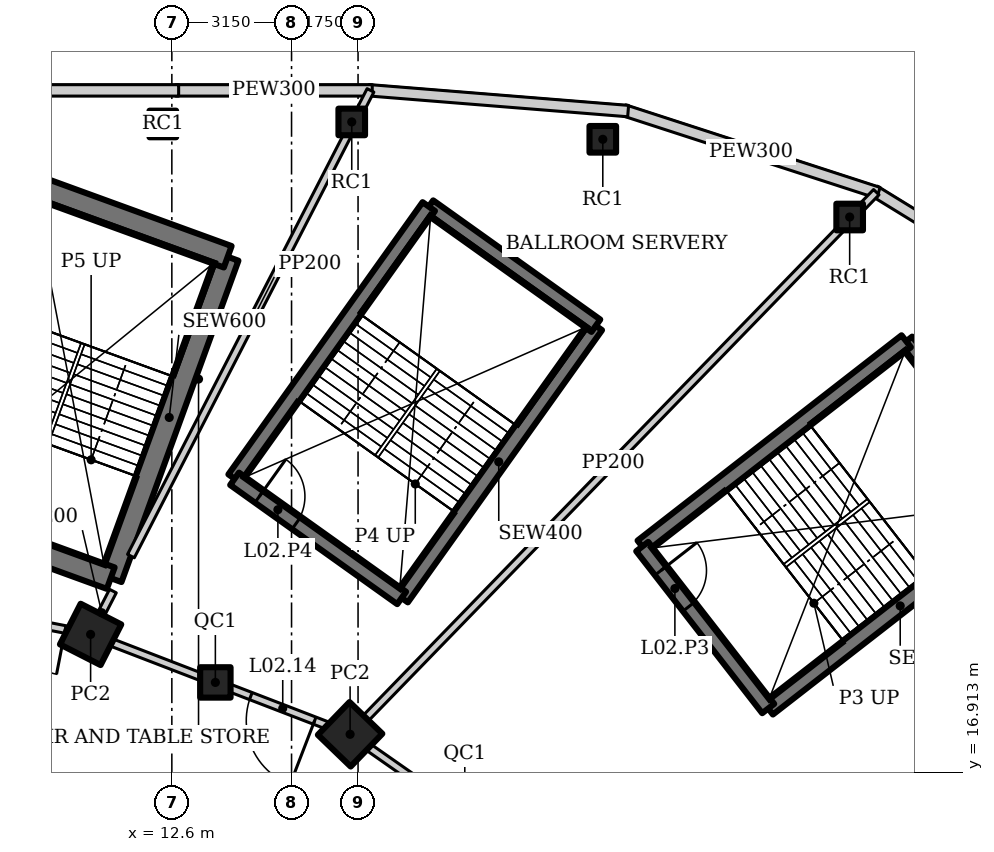
"""IFC4 building model, lengths in metres.
Left out: names, types, materials, properties, quantities, classifications, styles, units other than length and angle.
Written with IfcOpenShell. Run it as: python <this file> out.ifc"""

import sys

from ifc_helpers import new_model, si_unit, direction, frame, frame_2d, origin, origin_2d, place, context, subcontext, project, spatial, rectangle, hollow_rectangle, extrude, element, fill, save


model = new_model("IFC4")
c1 = context("Model", 3, precision=1e-05, world=origin(), true_north=direction((0.0, 1.0)))
c2 = subcontext(c1, "Body", "Model", "MODEL_VIEW")
j1 = project(units=[si_unit("LENGTHUNIT", "METRE"), si_unit("PLANEANGLEUNIT", "RADIAN")], contexts=[c1])
p1 = place(None, origin())
s1 = spatial("IfcSite", under=j1, at=p1, CompositionType="ELEMENT")
p2 = place(p1, origin())
s2 = spatial("IfcBuilding", under=s1, at=p2, CompositionType="ELEMENT")
p3 = place(p2, frame((0.0, 0.0, 14.5)))
s3 = spatial("IfcBuildingStorey", under=s2, at=p3, CompositionType="ELEMENT", Elevation=14.5)
for number, where, z_axis, x_axis in (
    (1, (17.291, 17.905, 0.0), (0.0, 0.0, 1.0), (0.695, 0.719, 0.0)),
    (2, (10.463, 20.534, 0.0), (0.0, 0.0, 1.0), (0.454, 0.891, 0.0)),
):
    element("IfcColumn", number, at=place(p3, frame(where, z_axis=z_axis, x_axis=x_axis)), inside=s3, PredefinedType="COLUMN", context=c2, shape_type="SweptSolid", body=[
        extrude(hollow_rectangle(XDim=1.2, YDim=1.2, WallThickness=0.1, at=origin_2d()), origin(), (0.0, 0.0, 1.0), 7.5),
    ])
p4 = place(p3, frame((13.745, 19.27, 0.0), z_axis=(0.0, 0.0, 1.0), x_axis=(1.0, 0.0, 0.0)))
e3 = element("IfcColumn", 3, at=p4, inside=s3, PredefinedType="COLUMN", context=c2, shape_type="SweptSolid", body=[
    extrude(hollow_rectangle(XDim=0.8, YDim=0.8, WallThickness=0.05, at=origin_2d()), origin(), (0.0, 0.0, 1.0), 7.5),
])
for number, where, z_axis, x_axis in (
    (4, (23.94, 33.563, 0.0), (0.0, 0.0, 1.0), (1.0, 0.0, 0.0)),
    (5, (12.363, 33.966, 0.0), (0.0, 0.0, 1.0), (1.0, 0.0, 0.0)),
    (6, (30.436, 31.518, 0.0), (0.0, 0.0, 1.0), (1.0, 0.0, 0.0)),
    (7, (17.334, 34.02, 0.0), (0.0, 0.0, 1.0), (1.0, 0.0, 0.0)),
):
    element("IfcColumn", number, at=place(p3, frame(where, z_axis=z_axis, x_axis=x_axis)), inside=s3, PredefinedType="COLUMN", context=c2, shape_type="SweptSolid", body=[
        extrude(hollow_rectangle(XDim=0.7, YDim=0.7, WallThickness=0.04, at=origin_2d()), origin(), (0.0, 0.0, 1.0), 7.5),
    ])
p5 = place(p3, frame((36.932, 28.608, 0.0), z_axis=(0.0, 0.0, 1.0), x_axis=(-0.851808565246, 0.52385319334, 0.0)))
e8 = element("IfcWall", 8, at=p5, inside=s3, PredefinedType="SOLIDWALL", context=c2, shape_type="SweptSolid", body=[
    extrude(rectangle(XDim=6.861, YDim=0.3, at=frame_2d((3.43, 0.0))), origin(), (0.0, 0.0, 1.0), 7.3),
])
p6 = place(p3, frame((31.192, 32.154, 0.0), z_axis=(0.0, 0.0, 1.0), x_axis=(-0.951140010357, 0.308759907853, 0.0)))
e9 = element("IfcWall", 9, at=p6, inside=s3, PredefinedType="SOLIDWALL", context=c2, shape_type="SweptSolid", body=[
    extrude(rectangle(XDim=7.041, YDim=0.3, at=frame_2d((3.521, 0.0))), origin(), (0.0, 0.0, 1.0), 7.3),
])
p7 = place(p3, frame((24.607, 34.306, 0.0), z_axis=(0.0, 0.0, 1.0), x_axis=(-0.996791084449, 0.080047073422, 0.0)))
e10 = element("IfcWall", 10, at=p7, inside=s3, PredefinedType="SOLIDWALL", context=c2, shape_type="SweptSolid", body=[
    extrude(rectangle(XDim=6.847, YDim=0.3, at=frame_2d((3.424, 0.0))), origin(), (0.0, 0.0, 1.0), 7.3),
])
p8 = place(p3, frame((17.873, 34.85, 0.0), z_axis=(0.0, 0.0, 1.0), x_axis=(-1.0, 0.0, 0.0)))
e11 = element("IfcWall", 11, at=p8, inside=s3, PredefinedType="SOLIDWALL", context=c2, shape_type="SweptSolid", body=[
    extrude(rectangle(XDim=5.174, YDim=0.3, at=frame_2d((2.587, 0.0))), origin(), (0.0, 0.0, 1.0), 7.3),
])
p9 = place(p3, frame((12.779, 34.85, 0.0), z_axis=(0.0, 0.0, 1.0), x_axis=(-1.0, 0.0, 0.0)))
e12 = element("IfcWall", 12, at=p9, inside=s3, PredefinedType="SOLIDWALL", context=c2, shape_type="SweptSolid", body=[
    extrude(rectangle(XDim=4.739, YDim=0.3, at=frame_2d((2.369, 0.0))), origin(), (0.0, 0.0, 1.0), 7.3),
])
p10 = place(p3, frame((20.309, 15.794, 0.0), z_axis=(0.0, 0.0, 1.0), x_axis=(-0.819409395821, 0.573208724672, 0.0)))
e13 = element("IfcWall", 13, at=p10, inside=s3, PredefinedType="SOLIDWALL", context=c2, shape_type="SweptSolid", body=[
    extrude(rectangle(XDim=3.683, YDim=0.2, at=frame_2d((1.841, 0.0))), origin(), (0.0, 0.0, 1.0), 6.896),
])
p11 = place(p3, frame((17.291, 17.905, 0.0), z_axis=(0.0, 0.0, 1.0), x_axis=(-0.933224646415, 0.359293416754, 0.0)))
e14 = element("IfcWall", 14, at=p11, inside=s3, PredefinedType="SOLIDWALL", context=c2, shape_type="SweptSolid", body=[
    extrude(rectangle(XDim=3.799, YDim=0.2, at=frame_2d((1.899, 0.0))), origin(), (0.0, 0.0, 1.0), 6.764),
])
p12 = place(p11, frame((1.0, 0.0, 0.0)))
e15 = element("IfcOpeningElement", 15, at=p12, cuts=e14, PredefinedType="OPENING", context=c2, shape_type="SweptSolid", body=[
    extrude(rectangle(XDim=1.8, YDim=2.4, at=frame_2d((0.9, 1.2))), frame((0.0, 0.11, 0.0), z_axis=(0.0, -1.0, 0.0), x_axis=(1.0, 0.0, 0.0)), (0.0, 0.0, 1.0), 0.22),
])
p13 = place(p3, frame((13.745, 19.27, 0.0), z_axis=(0.0, 0.0, 1.0), x_axis=(-0.933241815012, 0.359248820058, 0.0)))
e16 = element("IfcWall", 16, at=p13, inside=s3, PredefinedType="SOLIDWALL", context=c2, shape_type="SweptSolid", body=[
    extrude(rectangle(XDim=3.518, YDim=0.2, at=frame_2d((1.759, 0.0))), origin(), (0.0, 0.0, 1.0), 6.896),
])
p14 = place(p3, frame((10.463, 20.534, 0.0), z_axis=(0.0, 0.0, 1.0), x_axis=(-0.98163593748, 0.190763954266, 0.0)))
e17 = element("IfcWall", 17, at=p14, inside=s3, PredefinedType="SOLIDWALL", context=c2, shape_type="SweptSolid", body=[
    extrude(rectangle(XDim=2.844, YDim=0.2, at=frame_2d((1.422, 0.0))), origin(), (0.0, 0.0, 1.0), 6.838),
])
p15 = place(p14, frame((0.68, 0.0, 0.0)))
e18 = element("IfcOpeningElement", 18, at=p15, cuts=e17, PredefinedType="OPENING", context=c2, shape_type="SweptSolid", body=[
    extrude(rectangle(XDim=1.2, YDim=2.4, at=frame_2d((0.6, 1.2))), frame((0.0, 0.11, 0.0), z_axis=(0.0, -1.0, 0.0), x_axis=(1.0, 0.0, 0.0)), (0.0, 0.0, 1.0), 0.22),
])
p16 = place(p3, frame((17.291, 17.905, 0.0), z_axis=(0.0, 0.0, 1.0), x_axis=(0.696460684513, 0.717594951855, 0.0)))
e19 = element("IfcWall", 19, at=p16, inside=s3, PredefinedType="SOLIDWALL", context=c2, shape_type="SweptSolid", body=[
    extrude(rectangle(XDim=19.881, YDim=0.2, at=frame_2d((9.94, 0.0))), origin(), (0.0, 0.0, 1.0), 5.8),
])
p17 = place(p3, frame((10.463, 20.534, 0.0), z_axis=(0.0, 0.0, 1.0), x_axis=(0.457464149219, 0.889228065335, 0.0)))
e20 = element("IfcWall", 20, at=p17, inside=s3, PredefinedType="SOLIDWALL", context=c2, shape_type="SweptSolid", body=[
    extrude(rectangle(XDim=1.282, YDim=0.2, at=frame_2d((0.641, 0.0))), origin(), (0.0, 0.0, 1.0), 5.8),
])
p18 = place(p3, frame((11.523, 22.595, 0.0), z_axis=(0.0, 0.0, 1.0), x_axis=(0.457451679948, 0.889234480051, 0.0)))
e21 = element("IfcWall", 21, at=p18, inside=s3, PredefinedType="SOLIDWALL", context=c2, shape_type="SweptSolid", body=[
    extrude(rectangle(XDim=13.782, YDim=0.2, at=frame_2d((6.891, 0.0))), origin(), (0.0, 0.0, 1.0), 5.8),
])
p19 = place(p3, frame((28.293, 18.583, 0.0), z_axis=(0.0, 0.0, 1.0), x_axis=(0.78938060008, 0.613904119726, 0.0)))
e22 = element("IfcWall", 22, at=p19, inside=s3, PredefinedType="SHEAR", context=c2, shape_type="SweptSolid", body=[
    extrude(rectangle(XDim=8.8, YDim=0.4, at=frame_2d((4.4, 0.0))), origin(), (0.0, 0.0, 1.0), 7.5),
])
p20 = place(p3, frame((35.239, 23.985, 0.0), z_axis=(0.0, 0.0, 1.0), x_axis=(-0.613912443548, 0.789374126544, 0.0)))
e23 = element("IfcWall", 23, at=p20, inside=s3, PredefinedType="SHEAR", context=c2, shape_type="SweptSolid", body=[
    extrude(rectangle(XDim=5.4, YDim=0.4, at=frame_2d((2.7, 0.0))), origin(), (0.0, 0.0, 1.0), 7.5),
])
p21 = place(p3, frame((31.924, 28.248, 0.0), z_axis=(0.0, 0.0, 1.0), x_axis=(-0.78938060008, -0.613904119726, 0.0)))
e24 = element("IfcWall", 24, at=p21, inside=s3, PredefinedType="SHEAR", context=c2, shape_type="SweptSolid", body=[
    extrude(rectangle(XDim=8.8, YDim=0.4, at=frame_2d((4.4, 0.0))), origin(), (0.0, 0.0, 1.0), 7.5),
])
p22 = place(p3, frame((24.978, 22.846, 0.0), z_axis=(0.0, 0.0, 1.0), x_axis=(0.613912443548, -0.789374126544, 0.0)))
e25 = element("IfcWall", 25, at=p22, inside=s3, PredefinedType="SHEAR", context=c2, shape_type="SweptSolid", body=[
    extrude(rectangle(XDim=5.4, YDim=0.4, at=frame_2d((2.7, 0.0))), origin(), (0.0, 0.0, 1.0), 7.5),
])
p23 = place(p22, frame((0.8, 0.0, 0.0)))
e26 = element("IfcOpeningElement", 26, at=p23, cuts=e25, PredefinedType="OPENING", context=c2, shape_type="SweptSolid", body=[
    extrude(rectangle(XDim=1.2, YDim=2.1, at=frame_2d((0.6, 1.05))), frame((0.0, 0.21, 0.0), z_axis=(0.0, -1.0, 0.0), x_axis=(1.0, 0.0, 0.0)), (0.0, 0.0, 1.0), 0.42),
])
p24 = place(p3, frame((18.647, 21.493, 0.0), z_axis=(0.0, 0.0, 1.0), x_axis=(0.580705313356, 0.814113836659, 0.0)))
e27 = element("IfcWall", 27, at=p24, inside=s3, PredefinedType="SHEAR", context=c2, shape_type="SweptSolid", body=[
    extrude(rectangle(XDim=8.8, YDim=0.4, at=frame_2d((4.4, 0.0))), origin(), (0.0, 0.0, 1.0), 7.5),
])
p25 = place(p3, frame((23.757, 28.657, 0.0), z_axis=(0.0, 0.0, 1.0), x_axis=(-0.814121252423, 0.580694916762, 0.0)))
e28 = element("IfcWall", 28, at=p25, inside=s3, PredefinedType="SHEAR", context=c2, shape_type="SweptSolid", body=[
    extrude(rectangle(XDim=5.4, YDim=0.4, at=frame_2d((2.7, 0.0))), origin(), (0.0, 0.0, 1.0), 7.5),
])
p26 = place(p3, frame((19.361, 31.793, 0.0), z_axis=(0.0, 0.0, 1.0), x_axis=(-0.580705313356, -0.814113836659, 0.0)))
e29 = element("IfcWall", 29, at=p26, inside=s3, PredefinedType="SHEAR", context=c2, shape_type="SweptSolid", body=[
    extrude(rectangle(XDim=8.8, YDim=0.4, at=frame_2d((4.4, 0.0))), origin(), (0.0, 0.0, 1.0), 7.5),
])
p27 = place(p3, frame((14.251, 24.629, 0.0), z_axis=(0.0, 0.0, 1.0), x_axis=(0.814121252423, -0.580694916762, 0.0)))
e30 = element("IfcWall", 30, at=p27, inside=s3, PredefinedType="SHEAR", context=c2, shape_type="SweptSolid", body=[
    extrude(rectangle(XDim=5.4, YDim=0.4, at=frame_2d((2.7, 0.0))), origin(), (0.0, 0.0, 1.0), 7.5),
])
p28 = place(p27, frame((0.8, 0.0, 0.0)))
e31 = element("IfcOpeningElement", 31, at=p28, cuts=e30, PredefinedType="OPENING", context=c2, shape_type="SweptSolid", body=[
    extrude(rectangle(XDim=1.2, YDim=2.1, at=frame_2d((0.6, 1.05))), frame((0.0, 0.21, 0.0), z_axis=(0.0, -1.0, 0.0), x_axis=(1.0, 0.0, 0.0)), (0.0, 0.0, 1.0), 0.42),
])
p29 = place(p3, frame((10.992, 22.014, 0.0), z_axis=(0.0, 0.0, 1.0), x_axis=(0.342013127703, 0.939695174234, 0.0)))
e32 = element("IfcWall", 32, at=p29, inside=s3, PredefinedType="SHEAR", context=c2, shape_type="SweptSolid", body=[
    extrude(rectangle(XDim=9.0, YDim=0.6, at=frame_2d((4.5, 0.0))), origin(), (0.0, 0.0, 1.0), 7.5),
])
p30 = place(p3, frame((14.07, 30.471, 0.0), z_axis=(0.0, 0.0, 1.0), x_axis=(-0.939692822968, 0.342019587834, 0.0)))
e33 = element("IfcWall", 33, at=p30, inside=s3, PredefinedType="SHEAR", context=c2, shape_type="SweptSolid", body=[
    extrude(rectangle(XDim=5.6, YDim=0.6, at=frame_2d((2.8, 0.0))), origin(), (0.0, 0.0, 1.0), 7.5),
])
p31 = place(p3, frame((5.73, 23.93, 0.0), z_axis=(0.0, 0.0, 1.0), x_axis=(0.939678810556, -0.342058084236, 0.0)))
e34 = element("IfcWall", 34, at=p31, inside=s3, PredefinedType="SHEAR", context=c2, shape_type="SweptSolid", body=[
    extrude(rectangle(XDim=5.6, YDim=0.6, at=frame_2d((2.8, 0.0))), origin(), (0.0, 0.0, 1.0), 7.5),
])
p32 = place(p31, frame((0.9, 0.0, 0.0)))
e35 = element("IfcOpeningElement", 35, at=p32, cuts=e34, PredefinedType="OPENING", context=c2, shape_type="SweptSolid", body=[
    extrude(rectangle(XDim=1.2, YDim=2.1, at=frame_2d((0.6, 1.05))), frame((0.0, 0.31, 0.0), z_axis=(0.0, -1.0, 0.0), x_axis=(1.0, 0.0, 0.0)), (0.0, 0.0, 1.0), 0.62),
])
p33 = place(p12, origin())
e36 = element("IfcDoor", 36, at=p33, inside=s3, OperationType="DOUBLE_DOOR_DOUBLE_SWING", PredefinedType="DOOR", context=c2, shape_type="SweptSolid", body=[
    extrude(rectangle(XDim=1.8, YDim=2.4, at=frame_2d((0.9, 1.2))), frame((0.0, 0.025, 0.0), z_axis=(0.0, -1.0, 0.0), x_axis=(1.0, 0.0, 0.0)), (0.0, 0.0, 1.0), 0.05),
])
fill(e15, e36)
p34 = place(p15, origin())
e37 = element("IfcDoor", 37, at=p34, inside=s3, OperationType="SINGLE_SWING_RIGHT", PredefinedType="DOOR", context=c2, shape_type="SweptSolid", body=[
    extrude(rectangle(XDim=1.2, YDim=2.4, at=frame_2d((0.6, 1.2))), frame((0.0, 0.025, 0.0), z_axis=(0.0, -1.0, 0.0), x_axis=(1.0, 0.0, 0.0)), (0.0, 0.0, 1.0), 0.05),
])
fill(e18, e37)
p35 = place(p23, origin())
e38 = element("IfcDoor", 38, at=p35, inside=s3, OperationType="SINGLE_SWING_RIGHT", PredefinedType="DOOR", context=c2, shape_type="SweptSolid", body=[
    extrude(rectangle(XDim=1.2, YDim=2.1, at=frame_2d((0.6, 1.05))), frame((0.0, 0.025, 0.0), z_axis=(0.0, -1.0, 0.0), x_axis=(1.0, 0.0, 0.0)), (0.0, 0.0, 1.0), 0.05),
])
fill(e26, e38)
p36 = place(p28, origin())
e39 = element("IfcDoor", 39, at=p36, inside=s3, OperationType="SINGLE_SWING_RIGHT", PredefinedType="DOOR", context=c2, shape_type="SweptSolid", body=[
    extrude(rectangle(XDim=1.2, YDim=2.1, at=frame_2d((0.6, 1.05))), frame((0.0, 0.025, 0.0), z_axis=(0.0, -1.0, 0.0), x_axis=(1.0, 0.0, 0.0)), (0.0, 0.0, 1.0), 0.05),
])
fill(e31, e39)
save(model, sys.argv[1])
